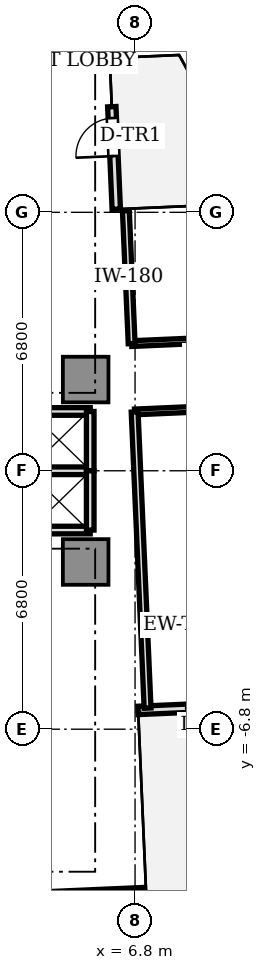
"""IFC4 building model, lengths in metres.
Left out: names, types, materials, properties, quantities, classifications, styles, units other than length and angle.
Written with IfcOpenShell. Run it as: python <this file> out.ifc"""

import sys

from ifc_helpers import new_model, si_unit, direction, frame, frame_2d, origin, origin_2d, place, context, subcontext, project, spatial, rectangle, extrude, source, transform, mapped, element, fill, save


model = new_model("IFC4")
c1 = context("Model", 3, precision=1e-05, world=origin(), true_north=direction((0.0, 1.0)))
c2 = subcontext(c1, "Body", "Model", "MODEL_VIEW")
j1 = project(units=[si_unit("LENGTHUNIT", "METRE"), si_unit("PLANEANGLEUNIT", "RADIAN")], contexts=[c1])
p1 = place(None, origin())
s1 = spatial("IfcSite", under=j1, at=p1, CompositionType="ELEMENT")
p2 = place(p1, origin())
s2 = spatial("IfcBuilding", under=s1, at=p2, CompositionType="ELEMENT")
p3 = place(p2, frame((0.0, 0.0, 128.2)))
s3 = spatial("IfcBuildingStorey", under=s2, at=p3, CompositionType="ELEMENT", Elevation=128.2)
m1 = source(origin(), c2, "Body", "SweptSolid", [
    extrude(rectangle(XDim=1.2, YDim=1.2, at=origin_2d()), origin(), (0.0, 0.0, 1.0), 3.11),
])
for number, where, z_axis, x_axis in (
    (1, (5.5, 2.4, 0.0), (0.0, 0.0, 1.0), (1.0, 0.0, 0.0)),
    (2, (5.5, -2.4, 0.0), (0.0, 0.0, 1.0), (1.0, 0.0, 0.0)),
):
    element("IfcColumn", number, at=place(p3, frame(where, z_axis=z_axis, x_axis=x_axis)), inside=s3, PredefinedType="COLUMN", context=c2, shape_type="MappedRepresentation", body=[
        mapped(m1, transform((0.0, 0.0, 0.0), scale=1.0)),
    ])
p4 = place(p3, frame((6.882, -6.306, 0.0), z_axis=(0.0, 0.0, 1.0), x_axis=(0.999045894436, 0.043672655174, 0.0)))
e3 = element("IfcWall", 3, at=p4, inside=s3, PredefinedType="STANDARD", context=c2, shape_type="SweptSolid", body=[
    extrude(rectangle(XDim=2.7, YDim=0.22, at=frame_2d((1.35, 0.0))), origin(), (0.0, 0.0, 1.0), 3.11),
])
p5 = place(p4, frame((1.4, 0.0, 0.0)))
e4 = element("IfcOpeningElement", 4, at=p5, cuts=e3, PredefinedType="OPENING", context=c2, shape_type="SweptSolid", body=[
    extrude(rectangle(XDim=1.0, YDim=2.2, at=frame_2d((0.5, 1.1))), frame((0.0, 0.12, 0.0), z_axis=(0.0, -1.0, 0.0), x_axis=(1.0, 0.0, 0.0)), (0.0, 0.0, 1.0), 0.24),
])
p6 = place(p3, frame((6.306, 6.882, 0.0), z_axis=(0.0, 0.0, 1.0), x_axis=(-0.043672655174, 0.999045894436, 0.0)))
e5 = element("IfcWall", 5, at=p6, inside=s3, PredefinedType="STANDARD", context=c2, shape_type="SweptSolid", body=[
    extrude(rectangle(XDim=2.7, YDim=0.22, at=frame_2d((1.35, 0.0))), origin(), (0.0, 0.0, 1.0), 3.11),
])
p7 = place(p6, frame((1.4, 0.0, 0.0)))
e6 = element("IfcOpeningElement", 6, at=p7, cuts=e5, PredefinedType="OPENING", context=c2, shape_type="SweptSolid", body=[
    extrude(rectangle(XDim=1.0, YDim=2.2, at=frame_2d((0.5, 1.1))), frame((0.0, 0.12, 0.0), z_axis=(0.0, -1.0, 0.0), x_axis=(1.0, 0.0, 0.0)), (0.0, 0.0, 1.0), 0.24),
])
for number, where, z_axis, x_axis in (
    (7, (3.98, 1.56, 0.0), (0.0, 0.0, 1.0), (1.0, 0.0, 0.0)),
    (8, (3.98, -1.56, 0.0), (0.0, 0.0, 1.0), (1.0, 0.0, 0.0)),
    (9, (3.98, 0.0, 0.0), (0.0, 0.0, 1.0), (1.0, 0.0, 0.0)),
):
    element("IfcWall", number, at=place(p3, frame(where, z_axis=z_axis, x_axis=x_axis)), inside=s3, PredefinedType="SOLIDWALL", context=c2, shape_type="SweptSolid", body=[
        extrude(rectangle(XDim=1.64, YDim=0.2, at=frame_2d((0.82, 0.0))), origin(), (0.0, 0.0, 1.0), 2.66),
    ])
for number, where, z_axis, x_axis in (
    (10, (5.62, 0.0, 0.0), (0.0, 0.0, 1.0), (0.0, 1.0, 0.0)),
    (11, (5.62, -1.56, 0.0), (0.0, 0.0, 1.0), (0.0, 1.0, 0.0)),
):
    element("IfcWall", number, at=place(p3, frame(where, z_axis=z_axis, x_axis=x_axis)), inside=s3, PredefinedType="SOLIDWALL", context=c2, shape_type="SweptSolid", body=[
        extrude(rectangle(XDim=1.56, YDim=0.2, at=frame_2d((0.78, 0.0))), origin(), (0.0, 0.0, 1.0), 2.66),
    ])
p8 = place(p3, frame((6.71, 3.346, 0.0), z_axis=(0.0, 0.0, 1.0), x_axis=(0.999048535483, 0.04361219725, 0.0)))
e12 = element("IfcWall", 12, at=p8, inside=s3, PredefinedType="PARTITIONING", context=c2, shape_type="SweptSolid", body=[
    extrude(rectangle(XDim=13.2, YDim=0.15, at=frame_2d((6.6, 0.0))), origin(), (0.0, 0.0, 1.0), 2.63),
])
p9 = place(p8, frame((1.967, 0.0, 0.0)))
e13 = element("IfcOpeningElement", 13, at=p9, cuts=e12, PredefinedType="OPENING", context=c2, shape_type="SweptSolid", body=[
    extrude(rectangle(XDim=0.85, YDim=2.1, at=frame_2d((0.425, 1.05))), frame((0.0, 0.085, 0.0), z_axis=(0.0, -1.0, 0.0), x_axis=(1.0, 0.0, 0.0)), (0.0, 0.0, 1.0), 0.17),
])
p10 = place(p8, frame((7.342, 0.0, 0.0)))
e14 = element("IfcOpeningElement", 14, at=p10, cuts=e12, PredefinedType="OPENING", context=c2, shape_type="SweptSolid", body=[
    extrude(rectangle(XDim=0.85, YDim=2.1, at=frame_2d((0.425, 1.05))), frame((0.0, 0.085, 0.0), z_axis=(0.0, -1.0, 0.0), x_axis=(1.0, 0.0, 0.0)), (0.0, 0.0, 1.0), 0.17),
])
p11 = place(p3, frame((6.789, 1.548, 0.0), z_axis=(0.0, 0.0, 1.0), x_axis=(0.999048500303, 0.043613003123, 0.0)))
e15 = element("IfcWall", 15, at=p11, inside=s3, PredefinedType="PARTITIONING", context=c2, shape_type="SweptSolid", body=[
    extrude(rectangle(XDim=13.2, YDim=0.15, at=frame_2d((6.6, 0.0))), origin(), (0.0, 0.0, 1.0), 2.66),
])
p12 = place(p11, frame((2.458, 0.0, 0.0)))
e16 = element("IfcOpeningElement", 16, at=p12, cuts=e15, PredefinedType="OPENING", context=c2, shape_type="SweptSolid", body=[
    extrude(rectangle(XDim=0.85, YDim=2.1, at=frame_2d((0.425, 1.05))), frame((0.0, 0.085, 0.0), z_axis=(0.0, -1.0, 0.0), x_axis=(1.0, 0.0, 0.0)), (0.0, 0.0, 1.0), 0.17),
])
p13 = place(p11, frame((9.308, 0.0, 0.0)))
e17 = element("IfcOpeningElement", 17, at=p13, cuts=e15, PredefinedType="OPENING", context=c2, shape_type="SweptSolid", body=[
    extrude(rectangle(XDim=0.85, YDim=2.1, at=frame_2d((0.425, 1.05))), frame((0.0, 0.085, 0.0), z_axis=(0.0, -1.0, 0.0), x_axis=(1.0, 0.0, 0.0)), (0.0, 0.0, 1.0), 0.17),
])
p14 = place(p3, frame((6.71, 3.346, 0.0), z_axis=(0.0, 0.0, 1.0), x_axis=(-0.043597663116, 0.999049169846, 0.0)))
e18 = element("IfcWall", 18, at=p14, inside=s3, PredefinedType="PARTITIONING", context=c2, shape_type="SweptSolid", body=[
    extrude(rectangle(XDim=3.5, YDim=0.18, at=frame_2d((1.75, 0.0))), origin(), (0.0, 0.0, 1.0), 2.66),
])
p15 = place(p3, frame((7.129, -6.245, 0.0), z_axis=(0.0, 0.0, 1.0), x_axis=(-0.043600217373, 0.999049058378, 0.0)))
e19 = element("IfcWall", 19, at=p15, inside=s3, PredefinedType="PARTITIONING", context=c2, shape_type="SweptSolid", body=[
    extrude(rectangle(XDim=7.8, YDim=0.18, at=frame_2d((3.9, 0.0))), origin(), (0.0, 0.0, 1.0), 2.66),
])
p16 = place(p3, frame((3.542, -11.206, 0.0), z_axis=(0.0, 0.0, 1.0), x_axis=(0.999046129111, 0.04366728647, 0.0)))
e20 = element("IfcWall", 20, at=p16, inside=s3, PredefinedType="PARTITIONING", context=c2, shape_type="SweptSolid", body=[
    extrude(rectangle(XDim=3.5, YDim=0.18, at=frame_2d((1.75, 0.0))), origin(), (0.0, 0.0, 1.0), 2.66),
])
m2 = source(origin(), c2, "Body", "SweptSolid", [
    extrude(rectangle(XDim=1.0, YDim=0.05, at=origin_2d()), origin(), (0.0, 0.0, 1.0), 2.2),
])
p17 = place(p7, frame((0.5, 0.0, 0.0)))
e21 = element("IfcDoor", 21, at=p17, inside=s3, OperationType="SINGLE_SWING_LEFT", PredefinedType="DOOR", context=c2, shape_type="MappedRepresentation", body=[
    mapped(m2, transform((0.0, 0.0, 0.0), scale=1.0)),
])
fill(e6, e21)
save(model, sys.argv[1])
